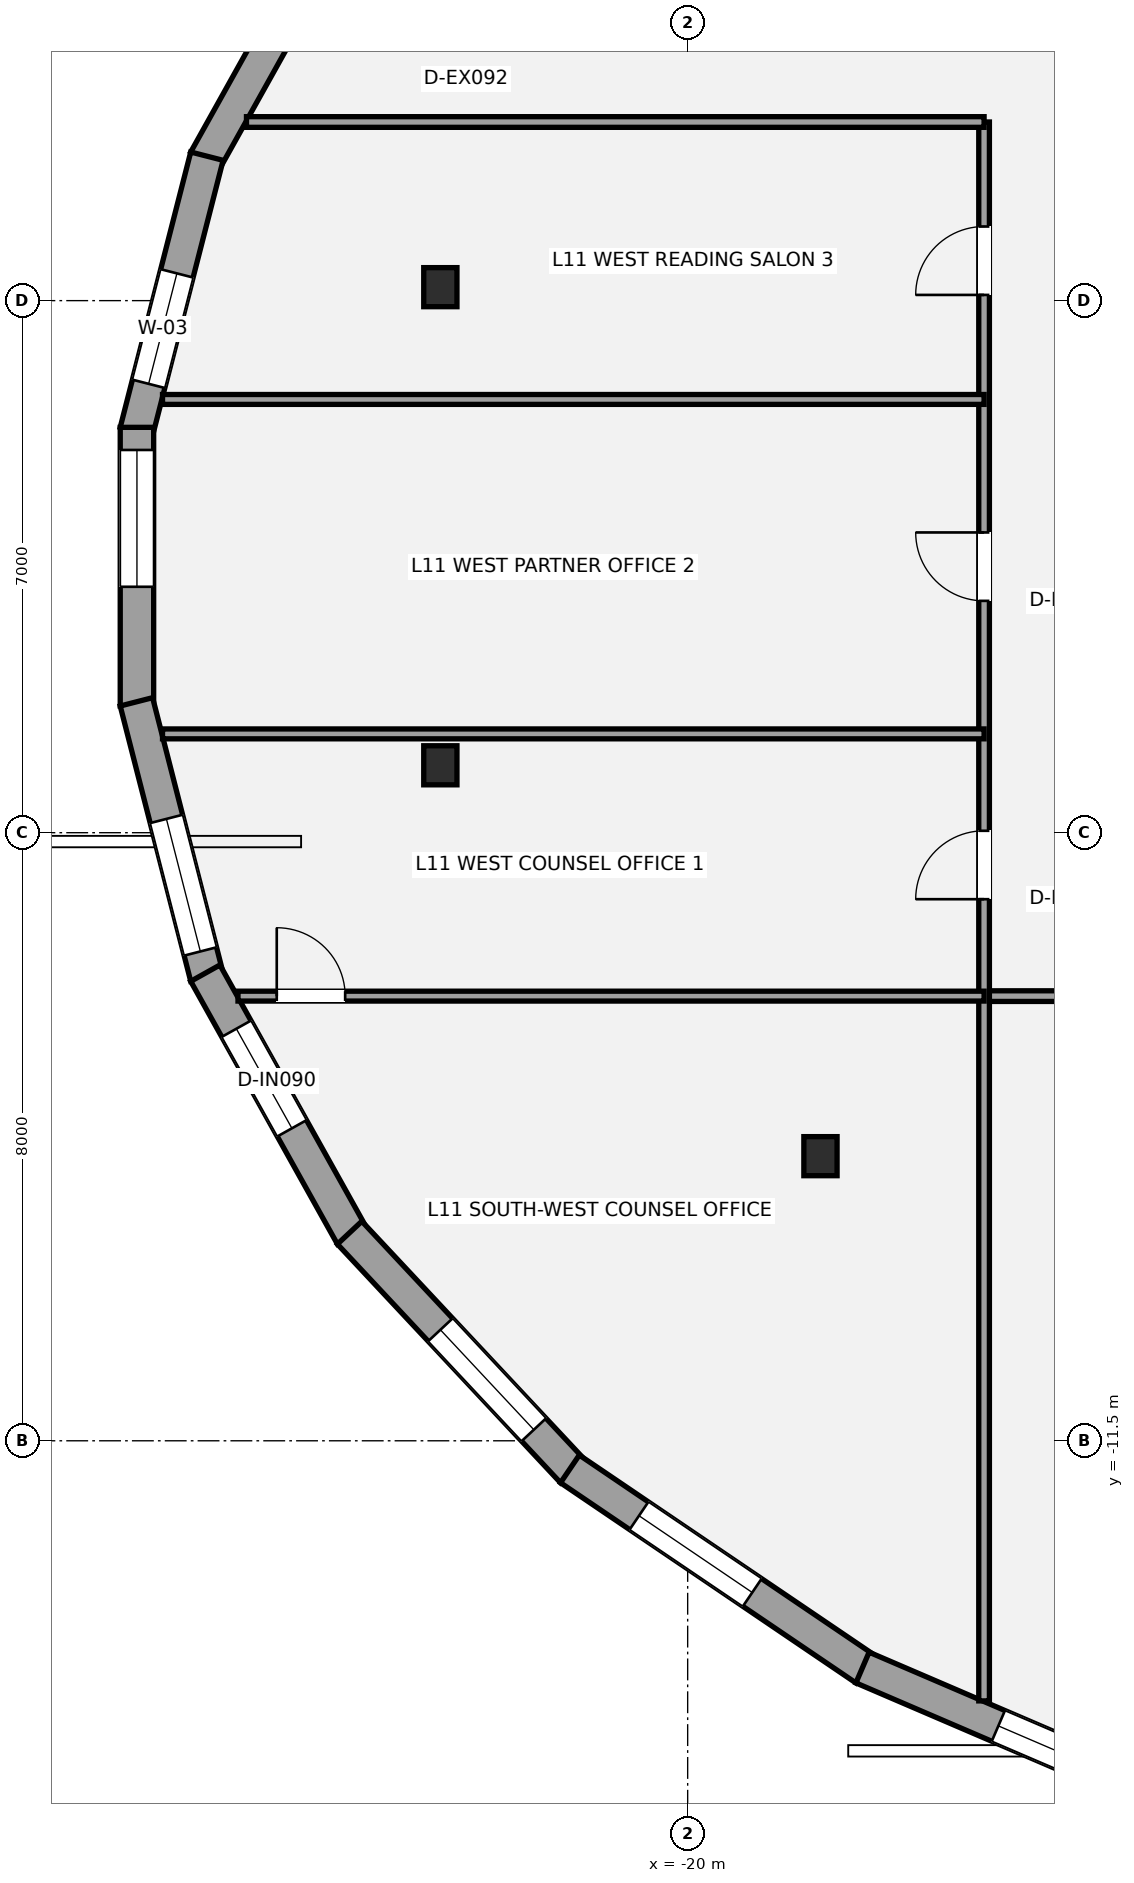
"""IFC4 building model, lengths in metres.
Left out: names, types, materials, properties, quantities, classifications, styles, units other than length and angle.
Written with IfcOpenShell. Run it as: python <this file> out.ifc"""

import sys

from ifc_helpers import new_model, si_unit, direction, frame, frame_2d, origin, origin_2d, place, context, subcontext, project, spatial, rectangle, i_section, extrude, element, fill, save


model = new_model("IFC4")
c1 = context("Model", 3, precision=1e-05, world=origin(), true_north=direction((0.0, 1.0)))
c2 = subcontext(c1, "Body", "Model", "MODEL_VIEW")
j1 = project(units=[si_unit("LENGTHUNIT", "METRE"), si_unit("PLANEANGLEUNIT", "RADIAN")], contexts=[c1])
p1 = place(None, origin())
s1 = spatial("IfcSite", under=j1, at=p1, CompositionType="ELEMENT")
p2 = place(p1, origin())
s2 = spatial("IfcBuilding", under=s1, at=p2, CompositionType="ELEMENT")
p3 = place(p2, frame((0.0, 0.0, 45.0)))
s3 = spatial("IfcBuildingStorey", under=s2, at=p3, CompositionType="ELEMENT", Elevation=45.0)
for number, where, z_axis, x_axis in (
    (1, (-23.254, 3.677, 0.0), (0.0, 0.0, 1.0), (1.0, 0.0, 0.0)),
    (2, (-23.254, -2.613, 0.0), (0.0, 0.0, 1.0), (1.0, 0.0, 0.0)),
    (3, (-18.253, -7.756, 0.0), (0.0, 0.0, 1.0), (1.0, 0.0, 0.0)),
):
    element("IfcColumn", number, at=place(p3, frame(where, z_axis=z_axis, x_axis=x_axis)), inside=s3, PredefinedType="COLUMN", context=c2, shape_type="SweptSolid", body=[
        extrude(i_section(OverallWidth=0.437, OverallDepth=0.514, WebThickness=0.061, FlangeThickness=0.097, at=origin_2d()), origin(), (0.0, 0.0, 1.0), 3.6),
    ])
p4 = place(p3, frame((-26.346, 5.348, 0.0), z_axis=(0.0, 0.0, 1.0), x_axis=(0.487369438963, 0.873195871477, 0.0)))
e4 = element("IfcWall", 4, at=p4, inside=s3, PredefinedType="STANDARD", context=c2, shape_type="SweptSolid", body=[
    extrude(rectangle(XDim=3.96, YDim=0.44, at=frame_2d((1.98, 0.0))), origin(), (0.0, 0.0, 1.0), 2.529),
])
p5 = place(p4, frame((2.761, 0.0, 0.58)))
e5 = element("IfcOpeningElement", 5, at=p5, cuts=e4, PredefinedType="OPENING", context=c2, shape_type="SweptSolid", body=[
    extrude(rectangle(XDim=0.9, YDim=1.35, at=frame_2d((0.45, 0.675))), frame((0.0, 0.23, 0.0), z_axis=(0.0, -1.0, 0.0), x_axis=(1.0, 0.0, 0.0)), (0.0, 0.0, 1.0), 0.46),
])
p6 = place(p3, frame((-27.253, 1.778, 0.0), z_axis=(0.0, 0.0, 1.0), x_axis=(0.248062710061, 0.968743976434, 0.0)))
e6 = element("IfcWall", 6, at=p6, inside=s3, PredefinedType="STANDARD", context=c2, shape_type="SweptSolid", body=[
    extrude(rectangle(XDim=3.739, YDim=0.44, at=frame_2d((1.87, 0.0))), origin(), (0.0, 0.0, 1.0), 2.529),
])
p7 = place(p6, frame((0.647, 0.0, 0.65)))
e7 = element("IfcOpeningElement", 7, at=p7, cuts=e6, PredefinedType="OPENING", context=c2, shape_type="SweptSolid", body=[
    extrude(rectangle(XDim=1.5, YDim=1.7, at=frame_2d((0.75, 0.85))), frame((0.0, 0.23, 0.0), z_axis=(0.0, -1.0, 0.0), x_axis=(1.0, 0.0, 0.0)), (0.0, 0.0, 1.0), 0.46),
])
p8 = place(p3, frame((-27.246, -1.833, 0.0), z_axis=(0.0, 0.0, 1.0), x_axis=(0.0, 1.0, 0.0)))
e8 = element("IfcWall", 8, at=p8, inside=s3, PredefinedType="STANDARD", context=c2, shape_type="SweptSolid", body=[
    extrude(rectangle(XDim=3.666, YDim=0.44, at=frame_2d((1.833, 0.0))), origin(), (0.0, 0.0, 1.0), 2.529),
])
p9 = place(p8, frame((1.568, 0.0, 0.65)))
e9 = element("IfcOpeningElement", 9, at=p9, cuts=e8, PredefinedType="OPENING", context=c2, shape_type="SweptSolid", body=[
    extrude(rectangle(XDim=1.8, YDim=1.7, at=frame_2d((0.9, 0.85))), frame((0.0, 0.23, 0.0), z_axis=(0.0, -1.0, 0.0), x_axis=(1.0, 0.0, 0.0)), (0.0, 0.0, 1.0), 0.46),
])
p10 = place(p3, frame((-26.325, -5.4, 0.0), z_axis=(0.0, 0.0, 1.0), x_axis=(-0.248062710061, 0.968743976434, 0.0)))
e10 = element("IfcWall", 10, at=p10, inside=s3, PredefinedType="STANDARD", context=c2, shape_type="SweptSolid", body=[
    extrude(rectangle(XDim=3.739, YDim=0.44, at=frame_2d((1.87, 0.0))), origin(), (0.0, 0.0, 1.0), 2.529),
])
p11 = place(p10, frame((0.349, 0.0, 0.65)))
e11 = element("IfcOpeningElement", 11, at=p11, cuts=e10, PredefinedType="OPENING", context=c2, shape_type="SweptSolid", body=[
    extrude(rectangle(XDim=1.8, YDim=1.7, at=frame_2d((0.9, 0.85))), frame((0.0, 0.23, 0.0), z_axis=(0.0, -1.0, 0.0), x_axis=(1.0, 0.0, 0.0)), (0.0, 0.0, 1.0), 0.46),
])
p12 = place(p3, frame((-24.416, -8.806, 0.0), z_axis=(0.0, 0.0, 1.0), x_axis=(-0.487369438963, 0.873195871477, 0.0)))
e12 = element("IfcWall", 12, at=p12, inside=s3, PredefinedType="STANDARD", context=c2, shape_type="SweptSolid", body=[
    extrude(rectangle(XDim=3.96, YDim=0.44, at=frame_2d((1.98, 0.0))), origin(), (0.0, 0.0, 1.0), 2.529),
])
p13 = place(p12, frame((1.622, 0.0, 0.65)))
e13 = element("IfcOpeningElement", 13, at=p13, cuts=e12, PredefinedType="OPENING", context=c2, shape_type="SweptSolid", body=[
    extrude(rectangle(XDim=1.5, YDim=1.7, at=frame_2d((0.75, 0.85))), frame((0.0, 0.23, 0.0), z_axis=(0.0, -1.0, 0.0), x_axis=(1.0, 0.0, 0.0)), (0.0, 0.0, 1.0), 0.46),
])
p14 = place(p3, frame((-21.512, -11.902, 0.0), z_axis=(0.0, 0.0, 1.0), x_axis=(-0.68299392258, 0.730424056093, 0.0)))
e14 = element("IfcWall", 14, at=p14, inside=s3, PredefinedType="STANDARD", context=c2, shape_type="SweptSolid", body=[
    extrude(rectangle(XDim=4.298, YDim=0.44, at=frame_2d((2.149, 0.0))), origin(), (0.0, 0.0, 1.0), 2.529),
])
p15 = place(p14, frame((0.75, 0.0, 0.65)))
e15 = element("IfcOpeningElement", 15, at=p15, cuts=e14, PredefinedType="OPENING", context=c2, shape_type="SweptSolid", body=[
    extrude(rectangle(XDim=1.8, YDim=1.7, at=frame_2d((0.9, 0.85))), frame((0.0, 0.23, 0.0), z_axis=(0.0, -1.0, 0.0), x_axis=(1.0, 0.0, 0.0)), (0.0, 0.0, 1.0), 0.46),
])
p16 = place(p3, frame((-17.663, -14.504, 0.0), z_axis=(0.0, 0.0, 1.0), x_axis=(-0.827825981515, 0.560984976919, 0.0)))
e16 = element("IfcWall", 16, at=p16, inside=s3, PredefinedType="STANDARD", context=c2, shape_type="SweptSolid", body=[
    extrude(rectangle(XDim=4.695, YDim=0.44, at=frame_2d((2.347, 0.0))), origin(), (0.0, 0.0, 1.0), 2.529),
])
p17 = place(p16, frame((1.796, 0.0, 0.65)))
e17 = element("IfcOpeningElement", 17, at=p17, cuts=e16, PredefinedType="OPENING", context=c2, shape_type="SweptSolid", body=[
    extrude(rectangle(XDim=1.8, YDim=1.7, at=frame_2d((0.9, 0.85))), frame((0.0, 0.23, 0.0), z_axis=(0.0, -1.0, 0.0), x_axis=(1.0, 0.0, 0.0)), (0.0, 0.0, 1.0), 0.46),
])
p18 = place(p3, frame((-13.067, -16.473, 0.0), z_axis=(0.0, 0.0, 1.0), x_axis=(-0.918881850071, 0.394532819433, 0.0)))
e18 = element("IfcWall", 18, at=p18, inside=s3, PredefinedType="STANDARD", context=c2, shape_type="SweptSolid", body=[
    extrude(rectangle(XDim=5.042, YDim=0.44, at=frame_2d((2.521, 0.0))), origin(), (0.0, 0.0, 1.0), 2.529),
])
p19 = place(p18, frame((1.297, 0.0, 0.65)))
e19 = element("IfcOpeningElement", 19, at=p19, cuts=e18, PredefinedType="OPENING", context=c2, shape_type="SweptSolid", body=[
    extrude(rectangle(XDim=1.8, YDim=1.7, at=frame_2d((0.9, 0.85))), frame((0.0, 0.23, 0.0), z_axis=(0.0, -1.0, 0.0), x_axis=(1.0, 0.0, 0.0)), (0.0, 0.0, 1.0), 0.46),
])
p20 = place(p3, frame((-16.1, -5.65, 0.0), z_axis=(0.0, 0.0, 1.0), x_axis=(1.0, 0.0, 0.0)))
e20 = element("IfcWall", 20, at=p20, inside=s3, PredefinedType="PARTITIONING", context=c2, shape_type="SweptSolid", body=[
    extrude(rectangle(XDim=34.1, YDim=0.14, at=frame_2d((17.05, 0.0))), origin(), (0.0, 0.0, 1.0), 2.853),
])
p21 = place(p20, frame((5.35, 0.0, 0.0)))
e21 = element("IfcOpeningElement", 21, at=p21, cuts=e20, PredefinedType="OPENING", context=c2, shape_type="SweptSolid", body=[
    extrude(rectangle(XDim=0.9, YDim=2.1, at=frame_2d((0.45, 1.05))), frame((0.0, 0.08, 0.0), z_axis=(0.0, -1.0, 0.0), x_axis=(1.0, 0.0, 0.0)), (0.0, 0.0, 1.0), 0.16),
])
p22 = place(p20, frame((15.85, 0.0, 0.0)))
e22 = element("IfcOpeningElement", 22, at=p22, cuts=e20, PredefinedType="OPENING", context=c2, shape_type="SweptSolid", body=[
    extrude(rectangle(XDim=1.5, YDim=2.15, at=frame_2d((0.75, 1.075))), frame((0.0, 0.08, 0.0), z_axis=(0.0, -1.0, 0.0), x_axis=(1.0, 0.0, 0.0)), (0.0, 0.0, 1.0), 0.16),
])
p23 = place(p20, frame((27.4, 0.0, 0.0)))
e23 = element("IfcOpeningElement", 23, at=p23, cuts=e20, PredefinedType="OPENING", context=c2, shape_type="SweptSolid", body=[
    extrude(rectangle(XDim=0.9, YDim=2.1, at=frame_2d((0.45, 1.05))), frame((0.0, 0.08, 0.0), z_axis=(0.0, -1.0, 0.0), x_axis=(1.0, 0.0, 0.0)), (0.0, 0.0, 1.0), 0.16),
])
p24 = place(p3, frame((-16.1, -14.922, 0.0), z_axis=(0.0, 0.0, 1.0), x_axis=(0.0, 1.0, 0.0)))
e24 = element("IfcWall", 24, at=p24, inside=s3, PredefinedType="PARTITIONING", context=c2, shape_type="SweptSolid", body=[
    extrude(rectangle(XDim=20.772, YDim=0.14, at=frame_2d((10.386, 0.0))), origin(), (0.0, 0.0, 1.0), 2.841),
])
p25 = place(p24, frame((10.547, 0.0, 0.0)))
e25 = element("IfcOpeningElement", 25, at=p25, cuts=e24, PredefinedType="OPENING", context=c2, shape_type="SweptSolid", body=[
    extrude(rectangle(XDim=0.9, YDim=2.1, at=frame_2d((0.45, 1.05))), frame((0.0, 0.08, 0.0), z_axis=(0.0, -1.0, 0.0), x_axis=(1.0, 0.0, 0.0)), (0.0, 0.0, 1.0), 0.16),
])
p26 = place(p24, frame((14.472, 0.0, 0.0)))
e26 = element("IfcOpeningElement", 26, at=p26, cuts=e24, PredefinedType="OPENING", context=c2, shape_type="SweptSolid", body=[
    extrude(rectangle(XDim=0.9, YDim=2.1, at=frame_2d((0.45, 1.05))), frame((0.0, 0.08, 0.0), z_axis=(0.0, -1.0, 0.0), x_axis=(1.0, 0.0, 0.0)), (0.0, 0.0, 1.0), 0.16),
])
p27 = place(p24, frame((18.497, 0.0, 0.0)))
e27 = element("IfcOpeningElement", 27, at=p27, cuts=e24, PredefinedType="OPENING", context=c2, shape_type="SweptSolid", body=[
    extrude(rectangle(XDim=0.9, YDim=2.1, at=frame_2d((0.45, 1.05))), frame((0.0, 0.08, 0.0), z_axis=(0.0, -1.0, 0.0), x_axis=(1.0, 0.0, 0.0)), (0.0, 0.0, 1.0), 0.16),
])
p28 = place(p3, frame((-25.805, 5.85, 0.0), z_axis=(0.0, 0.0, 1.0), x_axis=(1.0, 0.0, 0.0)))
e28 = element("IfcWall", 28, at=p28, inside=s3, PredefinedType="PARTITIONING", context=c2, shape_type="SweptSolid", body=[
    extrude(rectangle(XDim=9.705, YDim=0.14, at=frame_2d((4.852, 0.0))), origin(), (0.0, 0.0, 1.0), 2.853),
])
p29 = place(p3, frame((-25.917, -5.65, 0.0), z_axis=(0.0, 0.0, 1.0), x_axis=(1.0, 0.0, 0.0)))
e29 = element("IfcWall", 29, at=p29, inside=s3, PredefinedType="PARTITIONING", context=c2, shape_type="SweptSolid", body=[
    extrude(rectangle(XDim=9.816, YDim=0.13, at=frame_2d((4.908, 0.0))), origin(), (0.0, 0.0, 1.0), 2.779),
])
p30 = place(p29, frame((0.51, 0.0, 0.0)))
e30 = element("IfcOpeningElement", 30, at=p30, cuts=e29, PredefinedType="OPENING", context=c2, shape_type="SweptSolid", body=[
    extrude(rectangle(XDim=0.9, YDim=2.1, at=frame_2d((0.45, 1.05))), frame((0.0, 0.075, 0.0), z_axis=(0.0, -1.0, 0.0), x_axis=(1.0, 0.0, 0.0)), (0.0, 0.0, 1.0), 0.15),
])
for number, where, z_axis, x_axis in (
    (31, (-26.909, -2.2, 0.0), (0.0, 0.0, 1.0), (1.0, 0.0, 0.0)),
    (32, (-26.909, 2.2, 0.0), (0.0, 0.0, 1.0), (1.0, 0.0, 0.0)),
):
    element("IfcWall", number, at=place(p3, frame(where, z_axis=z_axis, x_axis=x_axis)), inside=s3, PredefinedType="PARTITIONING", context=c2, shape_type="SweptSolid", body=[
        extrude(rectangle(XDim=10.809, YDim=0.13, at=frame_2d((5.405, 0.0))), origin(), (0.0, 0.0, 1.0), 2.841),
    ])
p31 = place(p7, origin())
e33 = element("IfcWindow", 33, at=p31, inside=s3, PartitioningType="SINGLE_PANEL", PredefinedType="WINDOW", context=c2, shape_type="SweptSolid", body=[
    extrude(rectangle(XDim=1.5, YDim=1.7, at=frame_2d((0.75, 0.85))), frame((0.0, -0.01, 0.0), z_axis=(0.0, -1.0, 0.0), x_axis=(1.0, 0.0, 0.0)), (0.0, 0.0, 1.0), 0.06),
])
fill(e7, e33)
p32 = place(p9, origin())
e34 = element("IfcWindow", 34, at=p32, inside=s3, PartitioningType="SINGLE_PANEL", PredefinedType="WINDOW", context=c2, shape_type="SweptSolid", body=[
    extrude(rectangle(XDim=1.8, YDim=1.7, at=frame_2d((0.9, 0.85))), frame((0.0, -0.01, 0.0), z_axis=(0.0, -1.0, 0.0), x_axis=(1.0, 0.0, 0.0)), (0.0, 0.0, 1.0), 0.06),
])
fill(e9, e34)
p33 = place(p11, origin())
e35 = element("IfcWindow", 35, at=p33, inside=s3, PartitioningType="SINGLE_PANEL", PredefinedType="WINDOW", context=c2, shape_type="SweptSolid", body=[
    extrude(rectangle(XDim=1.8, YDim=1.7, at=frame_2d((0.9, 0.85))), frame((0.0, -0.01, 0.0), z_axis=(0.0, -1.0, 0.0), x_axis=(1.0, 0.0, 0.0)), (0.0, 0.0, 1.0), 0.06),
])
fill(e11, e35)
p34 = place(p13, origin())
e36 = element("IfcWindow", 36, at=p34, inside=s3, PartitioningType="SINGLE_PANEL", PredefinedType="WINDOW", context=c2, shape_type="SweptSolid", body=[
    extrude(rectangle(XDim=1.5, YDim=1.7, at=frame_2d((0.75, 0.85))), frame((0.0, -0.01, 0.0), z_axis=(0.0, -1.0, 0.0), x_axis=(1.0, 0.0, 0.0)), (0.0, 0.0, 1.0), 0.06),
])
fill(e13, e36)
p35 = place(p15, origin())
e37 = element("IfcWindow", 37, at=p35, inside=s3, PartitioningType="SINGLE_PANEL", PredefinedType="WINDOW", context=c2, shape_type="SweptSolid", body=[
    extrude(rectangle(XDim=1.8, YDim=1.7, at=frame_2d((0.9, 0.85))), frame((0.0, -0.01, 0.0), z_axis=(0.0, -1.0, 0.0), x_axis=(1.0, 0.0, 0.0)), (0.0, 0.0, 1.0), 0.06),
])
fill(e15, e37)
p36 = place(p17, origin())
e38 = element("IfcWindow", 38, at=p36, inside=s3, PartitioningType="SINGLE_PANEL", PredefinedType="WINDOW", context=c2, shape_type="SweptSolid", body=[
    extrude(rectangle(XDim=1.8, YDim=1.7, at=frame_2d((0.9, 0.85))), frame((0.0, -0.01, 0.0), z_axis=(0.0, -1.0, 0.0), x_axis=(1.0, 0.0, 0.0)), (0.0, 0.0, 1.0), 0.06),
])
fill(e17, e38)
p37 = place(p19, origin())
e39 = element("IfcWindow", 39, at=p37, inside=s3, PartitioningType="SINGLE_PANEL", PredefinedType="WINDOW", context=c2, shape_type="SweptSolid", body=[
    extrude(rectangle(XDim=1.8, YDim=1.7, at=frame_2d((0.9, 0.85))), frame((0.0, -0.01, 0.0), z_axis=(0.0, -1.0, 0.0), x_axis=(1.0, 0.0, 0.0)), (0.0, 0.0, 1.0), 0.06),
])
fill(e19, e39)
p38 = place(p30, origin())
e40 = element("IfcDoor", 40, at=p38, inside=s3, OperationType="SINGLE_SWING_LEFT", PredefinedType="DOOR", context=c2, shape_type="SweptSolid", body=[
    extrude(rectangle(XDim=0.9, YDim=2.1, at=frame_2d((0.45, 1.05))), frame((0.0, 0.025, 0.0), z_axis=(0.0, -1.0, 0.0), x_axis=(1.0, 0.0, 0.0)), (0.0, 0.0, 1.0), 0.05),
])
fill(e30, e40)
p39 = place(p25, origin())
e41 = element("IfcDoor", 41, at=p39, inside=s3, OperationType="SINGLE_SWING_LEFT", PredefinedType="DOOR", context=c2, shape_type="SweptSolid", body=[
    extrude(rectangle(XDim=0.9, YDim=2.1, at=frame_2d((0.45, 1.05))), frame((0.0, 0.025, 0.0), z_axis=(0.0, -1.0, 0.0), x_axis=(1.0, 0.0, 0.0)), (0.0, 0.0, 1.0), 0.05),
])
fill(e25, e41)
p40 = place(p26, origin())
e42 = element("IfcDoor", 42, at=p40, inside=s3, OperationType="SINGLE_SWING_RIGHT", PredefinedType="DOOR", context=c2, shape_type="SweptSolid", body=[
    extrude(rectangle(XDim=0.9, YDim=2.1, at=frame_2d((0.45, 1.05))), frame((0.0, 0.025, 0.0), z_axis=(0.0, -1.0, 0.0), x_axis=(1.0, 0.0, 0.0)), (0.0, 0.0, 1.0), 0.05),
])
fill(e26, e42)
p41 = place(p27, origin())
e43 = element("IfcDoor", 43, at=p41, inside=s3, OperationType="SINGLE_SWING_LEFT", PredefinedType="DOOR", context=c2, shape_type="SweptSolid", body=[
    extrude(rectangle(XDim=0.9, YDim=2.1, at=frame_2d((0.45, 1.05))), frame((0.0, 0.025, 0.0), z_axis=(0.0, -1.0, 0.0), x_axis=(1.0, 0.0, 0.0)), (0.0, 0.0, 1.0), 0.05),
])
fill(e27, e43)
save(model, sys.argv[1])
